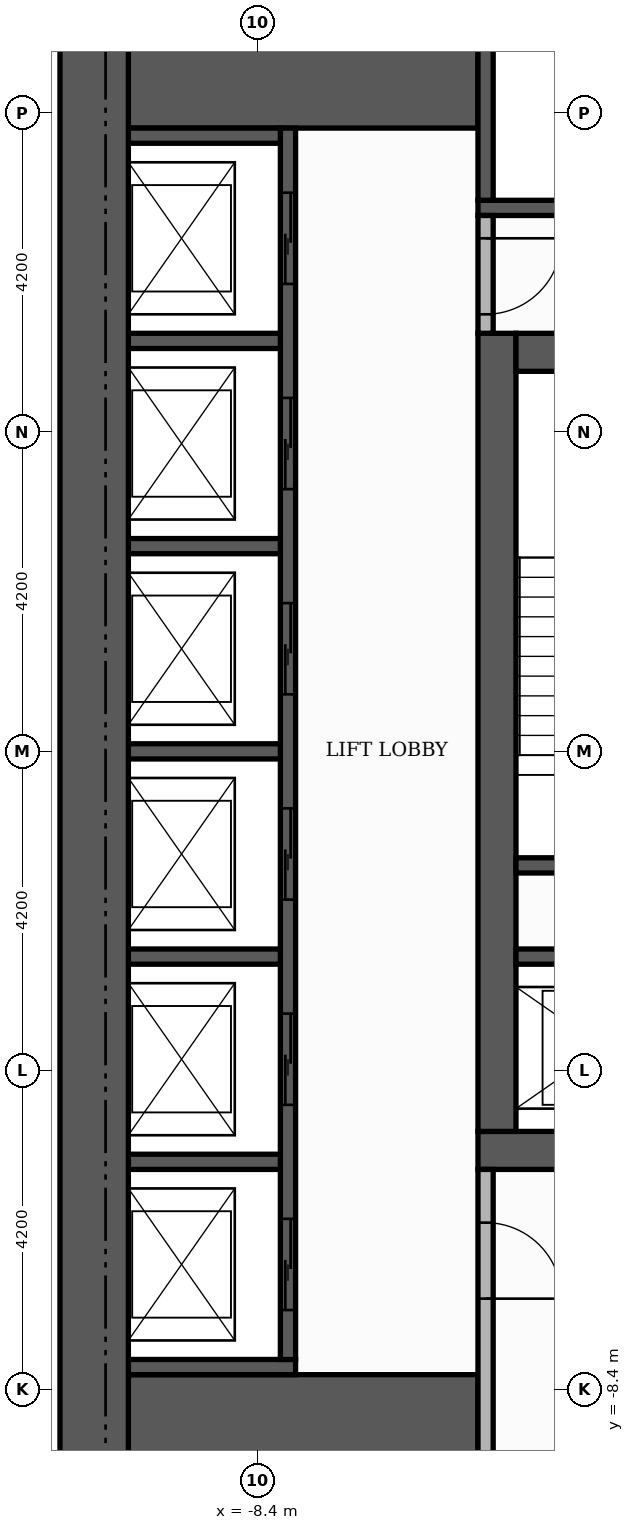
"""IFC4 building model, lengths in metres.
Left out: names, types, materials, properties, quantities, classifications, styles, units other than length and angle.
Written with IfcOpenShell. Run it as: python <this file> out.ifc"""

import sys

from ifc_helpers import new_model, si_unit, direction, frame, frame_2d, origin, place, context, subcontext, project, spatial, rectangle, extrude, element, fill, save


model = new_model("IFC4")
c1 = context("Model", 3, precision=1e-05, world=origin(), true_north=direction((0.0, 1.0)))
c2 = subcontext(c1, "Body", "Model", "MODEL_VIEW")
j1 = project(units=[si_unit("LENGTHUNIT", "METRE"), si_unit("PLANEANGLEUNIT", "RADIAN")], contexts=[c1])
p1 = place(None, origin())
s1 = spatial("IfcSite", under=j1, at=p1, CompositionType="ELEMENT")
p2 = place(p1, origin())
s2 = spatial("IfcBuilding", under=s1, at=p2, CompositionType="ELEMENT")
p3 = place(p2, frame((0.0, 0.0, 66.0)))
s3 = spatial("IfcBuildingStorey", under=s2, at=p3, CompositionType="ELEMENT", Elevation=66.0)
p4 = place(p3, frame((-5.5, -5.25, 0.0), z_axis=(0.0, 0.0, 1.0), x_axis=(1.0, 0.0, 0.0)))
e1 = element("IfcWall", 1, at=p4, inside=s3, PredefinedType="SHEAR", context=c2, shape_type="SweptSolid", body=[
    extrude(rectangle(XDim=11.0, YDim=0.5, at=frame_2d((5.5, 0.0))), origin(), (0.0, 0.0, 1.0), 3.48),
])
p5 = place(p4, frame((4.9, 0.0, 0.0)))
e2 = element("IfcOpeningElement", 2, at=p5, cuts=e1, PredefinedType="OPENING", context=c2, shape_type="SweptSolid", body=[
    extrude(rectangle(XDim=1.2, YDim=2.1, at=frame_2d((0.6, 1.05))), frame((0.0, 0.26, 0.0), z_axis=(0.0, -1.0, 0.0), x_axis=(1.0, 0.0, 0.0)), (0.0, 0.0, 1.0), 0.52),
])
p6 = place(p3, frame((-5.25, -5.0, 0.0), z_axis=(0.0, 0.0, 1.0), x_axis=(0.0, 1.0, 0.0)))
e3 = element("IfcWall", 3, at=p6, inside=s3, PredefinedType="SHEAR", context=c2, shape_type="SweptSolid", body=[
    extrude(rectangle(XDim=10.5, YDim=0.5, at=frame_2d((5.25, 0.0))), origin(), (0.0, 0.0, 1.0), 3.48),
])
p7 = place(p3, frame((-5.0, 5.25, 0.0), z_axis=(0.0, 0.0, 1.0), x_axis=(1.0, 0.0, 0.0)))
e4 = element("IfcWall", 4, at=p7, inside=s3, PredefinedType="SHEAR", context=c2, shape_type="SweptSolid", body=[
    extrude(rectangle(XDim=10.0, YDim=0.5, at=frame_2d((5.0, 0.0))), origin(), (0.0, 0.0, 1.0), 3.48),
])
p8 = place(p7, frame((4.4, 0.0, 0.0)))
e5 = element("IfcOpeningElement", 5, at=p8, cuts=e4, PredefinedType="OPENING", context=c2, shape_type="SweptSolid", body=[
    extrude(rectangle(XDim=1.2, YDim=2.1, at=frame_2d((0.6, 1.05))), frame((0.0, 0.26, 0.0), z_axis=(0.0, -1.0, 0.0), x_axis=(1.0, 0.0, 0.0)), (0.0, 0.0, 1.0), 0.52),
])
for number, where, z_axis, x_axis in (
    (6, (-10.1, -9.15, 0.0), (0.0, 0.0, 1.0), (1.0, 0.0, 0.0)),
    (7, (-10.1, 9.15, 0.0), (0.0, 0.0, 1.0), (1.0, 0.0, 0.0)),
):
    element("IfcWall", number, at=place(p3, frame(where, z_axis=z_axis, x_axis=x_axis)), inside=s3, PredefinedType="SHEAR", context=c2, shape_type="SweptSolid", body=[
        extrude(rectangle(XDim=4.6, YDim=1.9, at=frame_2d((2.3, 0.0))), origin(), (0.0, 0.0, 1.0), 3.48),
    ])
p9 = place(p3, frame((-5.0, -1.5, 0.0), z_axis=(0.0, 0.0, 1.0), x_axis=(1.0, 0.0, 0.0)))
e8 = element("IfcWall", 8, at=p9, inside=s3, PredefinedType="SHEAR", context=c2, shape_type="SweptSolid", body=[
    extrude(rectangle(XDim=3.05, YDim=0.2, at=frame_2d((1.525, 0.0))), origin(), (0.0, 0.0, 1.0), 3.48),
])
p10 = place(p3, frame((-5.5, 7.15, 0.0), z_axis=(0.0, 0.0, 1.0), x_axis=(1.0, 0.0, 0.0)))
e9 = element("IfcWall", 9, at=p10, inside=s3, PredefinedType="SHEAR", context=c2, shape_type="SweptSolid", body=[
    extrude(rectangle(XDim=6.8, YDim=0.2, at=frame_2d((3.4, 0.0))), origin(), (0.0, 0.0, 1.0), 3.48),
])
p11 = place(p3, frame((-5.4, 7.25, 0.0), z_axis=(0.0, 0.0, 1.0), x_axis=(0.0, 1.0, 0.0)))
e10 = element("IfcWall", 10, at=p11, inside=s3, PredefinedType="SHEAR", context=c2, shape_type="SweptSolid", body=[
    extrude(rectangle(XDim=2.85, YDim=0.2, at=frame_2d((1.425, 0.0))), origin(), (0.0, 0.0, 1.0), 3.48),
])
p12 = place(p3, frame((-10.1, -8.1, 0.0), z_axis=(0.0, 0.0, 1.0), x_axis=(1.0, 0.0, 0.0)))
e11 = element("IfcWall", 11, at=p12, inside=s3, PredefinedType="SHEAR", context=c2, shape_type="SweptSolid", body=[
    extrude(rectangle(XDim=2.2, YDim=0.2, at=frame_2d((1.1, 0.0))), origin(), (0.0, 0.0, 1.0), 3.48),
])
p13 = place(p3, frame((-8.0, -8.0, 0.0), z_axis=(0.0, 0.0, 1.0), x_axis=(0.0, 1.0, 0.0)))
e12 = element("IfcWall", 12, at=p13, inside=s3, PredefinedType="SHEAR", context=c2, shape_type="SweptSolid", body=[
    extrude(rectangle(XDim=16.2, YDim=0.2, at=frame_2d((8.1, 0.0))), origin(), (0.0, 0.0, 1.0), 3.48),
])
p14 = place(p13, frame((0.65, 0.0, 0.0)))
e13 = element("IfcOpeningElement", 13, at=p14, cuts=e12, PredefinedType="OPENING", context=c2, shape_type="SweptSolid", body=[
    extrude(rectangle(XDim=1.2, YDim=2.1, at=frame_2d((0.6, 1.05))), frame((0.0, 0.11, 0.0), z_axis=(0.0, -1.0, 0.0), x_axis=(1.0, 0.0, 0.0)), (0.0, 0.0, 1.0), 0.22),
])
p15 = place(p13, frame((3.35, 0.0, 0.0)))
e14 = element("IfcOpeningElement", 14, at=p15, cuts=e12, PredefinedType="OPENING", context=c2, shape_type="SweptSolid", body=[
    extrude(rectangle(XDim=1.2, YDim=2.1, at=frame_2d((0.6, 1.05))), frame((0.0, 0.11, 0.0), z_axis=(0.0, -1.0, 0.0), x_axis=(1.0, 0.0, 0.0)), (0.0, 0.0, 1.0), 0.22),
])
p16 = place(p13, frame((6.05, 0.0, 0.0)))
e15 = element("IfcOpeningElement", 15, at=p16, cuts=e12, PredefinedType="OPENING", context=c2, shape_type="SweptSolid", body=[
    extrude(rectangle(XDim=1.2, YDim=2.1, at=frame_2d((0.6, 1.05))), frame((0.0, 0.11, 0.0), z_axis=(0.0, -1.0, 0.0), x_axis=(1.0, 0.0, 0.0)), (0.0, 0.0, 1.0), 0.22),
])
p17 = place(p13, frame((8.75, 0.0, 0.0)))
e16 = element("IfcOpeningElement", 16, at=p17, cuts=e12, PredefinedType="OPENING", context=c2, shape_type="SweptSolid", body=[
    extrude(rectangle(XDim=1.2, YDim=2.1, at=frame_2d((0.6, 1.05))), frame((0.0, 0.11, 0.0), z_axis=(0.0, -1.0, 0.0), x_axis=(1.0, 0.0, 0.0)), (0.0, 0.0, 1.0), 0.22),
])
p18 = place(p13, frame((11.45, 0.0, 0.0)))
e17 = element("IfcOpeningElement", 17, at=p18, cuts=e12, PredefinedType="OPENING", context=c2, shape_type="SweptSolid", body=[
    extrude(rectangle(XDim=1.2, YDim=2.1, at=frame_2d((0.6, 1.05))), frame((0.0, 0.11, 0.0), z_axis=(0.0, -1.0, 0.0), x_axis=(1.0, 0.0, 0.0)), (0.0, 0.0, 1.0), 0.22),
])
p19 = place(p13, frame((14.15, 0.0, 0.0)))
e18 = element("IfcOpeningElement", 18, at=p19, cuts=e12, PredefinedType="OPENING", context=c2, shape_type="SweptSolid", body=[
    extrude(rectangle(XDim=1.2, YDim=2.1, at=frame_2d((0.6, 1.05))), frame((0.0, 0.11, 0.0), z_axis=(0.0, -1.0, 0.0), x_axis=(1.0, 0.0, 0.0)), (0.0, 0.0, 1.0), 0.22),
])
for number, where, z_axis, x_axis in (
    (19, (-10.1, -5.4, 0.0), (0.0, 0.0, 1.0), (1.0, 0.0, 0.0)),
    (20, (-10.1, -2.7, 0.0), (0.0, 0.0, 1.0), (1.0, 0.0, 0.0)),
):
    element("IfcWall", number, at=place(p3, frame(where, z_axis=z_axis, x_axis=x_axis)), inside=s3, PredefinedType="SHEAR", context=c2, shape_type="SweptSolid", body=[
        extrude(rectangle(XDim=2.0, YDim=0.2, at=frame_2d((1.0, 0.0))), origin(), (0.0, 0.0, 1.0), 3.48),
    ])
p20 = place(p3, frame((-5.0, -2.7, 0.0), z_axis=(0.0, 0.0, 1.0), x_axis=(1.0, 0.0, 0.0)))
e21 = element("IfcWall", 21, at=p20, inside=s3, PredefinedType="SHEAR", context=c2, shape_type="SweptSolid", body=[
    extrude(rectangle(XDim=2.85, YDim=0.2, at=frame_2d((1.425, 0.0))), origin(), (0.0, 0.0, 1.0), 3.48),
])
for number, where, z_axis, x_axis in (
    (22, (-10.1, 0.0, 0.0), (0.0, 0.0, 1.0), (1.0, 0.0, 0.0)),
    (23, (-10.1, 2.7, 0.0), (0.0, 0.0, 1.0), (1.0, 0.0, 0.0)),
    (24, (-10.1, 5.4, 0.0), (0.0, 0.0, 1.0), (1.0, 0.0, 0.0)),
    (25, (-10.1, 8.1, 0.0), (0.0, 0.0, 1.0), (1.0, 0.0, 0.0)),
):
    element("IfcWall", number, at=place(p3, frame(where, z_axis=z_axis, x_axis=x_axis)), inside=s3, PredefinedType="SHEAR", context=c2, shape_type="SweptSolid", body=[
        extrude(rectangle(XDim=2.0, YDim=0.2, at=frame_2d((1.0, 0.0))), origin(), (0.0, 0.0, 1.0), 3.48),
    ])
p21 = place(p3, frame((-10.55, -10.1, 0.0), z_axis=(0.0, 0.0, 1.0), x_axis=(0.0, 1.0, 0.0)))
e26 = element("IfcWall", 26, at=p21, inside=s3, PredefinedType="SHEAR", context=c2, shape_type="SweptSolid", body=[
    extrude(rectangle(XDim=20.2, YDim=0.9, at=frame_2d((10.1, 0.0))), origin(), (0.0, 0.0, 1.0), 3.48),
])
p22 = place(p3, frame((-5.4, -10.1, 0.0), z_axis=(0.0, 0.0, 1.0), x_axis=(0.0, 1.0, 0.0)))
e27 = element("IfcWall", 27, at=p22, inside=s3, PredefinedType="PARTITIONING", context=c2, shape_type="SweptSolid", body=[
    extrude(rectangle(XDim=4.6, YDim=0.2, at=frame_2d((2.3, 0.0))), origin(), (0.0, 0.0, 1.0), 3.48),
])
p23 = place(p22, frame((2.9, 0.0, 0.0)))
e28 = element("IfcOpeningElement", 28, at=p23, cuts=e27, PredefinedType="OPENING", context=c2, shape_type="SweptSolid", body=[
    extrude(rectangle(XDim=1.0, YDim=2.1, at=frame_2d((0.5, 1.05))), frame((0.0, 0.11, 0.0), z_axis=(0.0, -1.0, 0.0), x_axis=(1.0, 0.0, 0.0)), (0.0, 0.0, 1.0), 0.22),
])
p24 = place(p3, frame((-5.4, 5.5, 0.0), z_axis=(0.0, 0.0, 1.0), x_axis=(0.0, 1.0, 0.0)))
e29 = element("IfcWall", 29, at=p24, inside=s3, PredefinedType="PARTITIONING", context=c2, shape_type="SweptSolid", body=[
    extrude(rectangle(XDim=1.55, YDim=0.2, at=frame_2d((0.775, 0.0))), origin(), (0.0, 0.0, 1.0), 3.48),
])
p25 = place(p24, frame((0.25, 0.0, 0.0)))
e30 = element("IfcOpeningElement", 30, at=p25, cuts=e29, PredefinedType="OPENING", context=c2, shape_type="SweptSolid", body=[
    extrude(rectangle(XDim=1.0, YDim=2.1, at=frame_2d((0.5, 1.05))), frame((0.0, 0.11, 0.0), z_axis=(0.0, -1.0, 0.0), x_axis=(1.0, 0.0, 0.0)), (0.0, 0.0, 1.0), 0.22),
])
p26 = place(p14, origin())
e31 = element("IfcDoor", 31, at=p26, inside=s3, OperationType="SLIDING_TO_LEFT", PredefinedType="DOOR", context=c2, shape_type="SweptSolid", body=[
    extrude(rectangle(XDim=1.2, YDim=2.1, at=frame_2d((0.6, 1.05))), frame((0.0, 0.025, 0.0), z_axis=(0.0, -1.0, 0.0), x_axis=(1.0, 0.0, 0.0)), (0.0, 0.0, 1.0), 0.05),
])
fill(e13, e31)
p27 = place(p15, origin())
e32 = element("IfcDoor", 32, at=p27, inside=s3, OperationType="SLIDING_TO_LEFT", PredefinedType="DOOR", context=c2, shape_type="SweptSolid", body=[
    extrude(rectangle(XDim=1.2, YDim=2.1, at=frame_2d((0.6, 1.05))), frame((0.0, 0.025, 0.0), z_axis=(0.0, -1.0, 0.0), x_axis=(1.0, 0.0, 0.0)), (0.0, 0.0, 1.0), 0.05),
])
fill(e14, e32)
p28 = place(p16, origin())
e33 = element("IfcDoor", 33, at=p28, inside=s3, OperationType="SLIDING_TO_LEFT", PredefinedType="DOOR", context=c2, shape_type="SweptSolid", body=[
    extrude(rectangle(XDim=1.2, YDim=2.1, at=frame_2d((0.6, 1.05))), frame((0.0, 0.025, 0.0), z_axis=(0.0, -1.0, 0.0), x_axis=(1.0, 0.0, 0.0)), (0.0, 0.0, 1.0), 0.05),
])
fill(e15, e33)
p29 = place(p17, origin())
e34 = element("IfcDoor", 34, at=p29, inside=s3, OperationType="SLIDING_TO_LEFT", PredefinedType="DOOR", context=c2, shape_type="SweptSolid", body=[
    extrude(rectangle(XDim=1.2, YDim=2.1, at=frame_2d((0.6, 1.05))), frame((0.0, 0.025, 0.0), z_axis=(0.0, -1.0, 0.0), x_axis=(1.0, 0.0, 0.0)), (0.0, 0.0, 1.0), 0.05),
])
fill(e16, e34)
p30 = place(p18, origin())
e35 = element("IfcDoor", 35, at=p30, inside=s3, OperationType="SLIDING_TO_LEFT", PredefinedType="DOOR", context=c2, shape_type="SweptSolid", body=[
    extrude(rectangle(XDim=1.2, YDim=2.1, at=frame_2d((0.6, 1.05))), frame((0.0, 0.025, 0.0), z_axis=(0.0, -1.0, 0.0), x_axis=(1.0, 0.0, 0.0)), (0.0, 0.0, 1.0), 0.05),
])
fill(e17, e35)
p31 = place(p19, origin())
e36 = element("IfcDoor", 36, at=p31, inside=s3, OperationType="SLIDING_TO_LEFT", PredefinedType="DOOR", context=c2, shape_type="SweptSolid", body=[
    extrude(rectangle(XDim=1.2, YDim=2.1, at=frame_2d((0.6, 1.05))), frame((0.0, 0.025, 0.0), z_axis=(0.0, -1.0, 0.0), x_axis=(1.0, 0.0, 0.0)), (0.0, 0.0, 1.0), 0.05),
])
fill(e18, e36)
p32 = place(p25, frame((1.0, 0.0, 0.0), z_axis=(0.0, 0.0, 1.0), x_axis=(-1.0, 0.0, 0.0)))
e37 = element("IfcDoor", 37, at=p32, inside=s3, OperationType="SINGLE_SWING_RIGHT", PredefinedType="DOOR", context=c2, shape_type="SweptSolid", body=[
    extrude(rectangle(XDim=1.0, YDim=2.1, at=frame_2d((0.5, 1.05))), frame((0.0, 0.025, 0.0), z_axis=(0.0, -1.0, 0.0), x_axis=(1.0, 0.0, 0.0)), (0.0, 0.0, 1.0), 0.05),
])
fill(e30, e37)
p33 = place(p23, frame((1.0, 0.0, 0.0), z_axis=(0.0, 0.0, 1.0), x_axis=(-1.0, 0.0, 0.0)))
e38 = element("IfcDoor", 38, at=p33, inside=s3, OperationType="SINGLE_SWING_LEFT", PredefinedType="DOOR", context=c2, shape_type="SweptSolid", body=[
    extrude(rectangle(XDim=1.0, YDim=2.1, at=frame_2d((0.5, 1.05))), frame((0.0, 0.025, 0.0), z_axis=(0.0, -1.0, 0.0), x_axis=(1.0, 0.0, 0.0)), (0.0, 0.0, 1.0), 0.05),
])
fill(e28, e38)
save(model, sys.argv[1])
